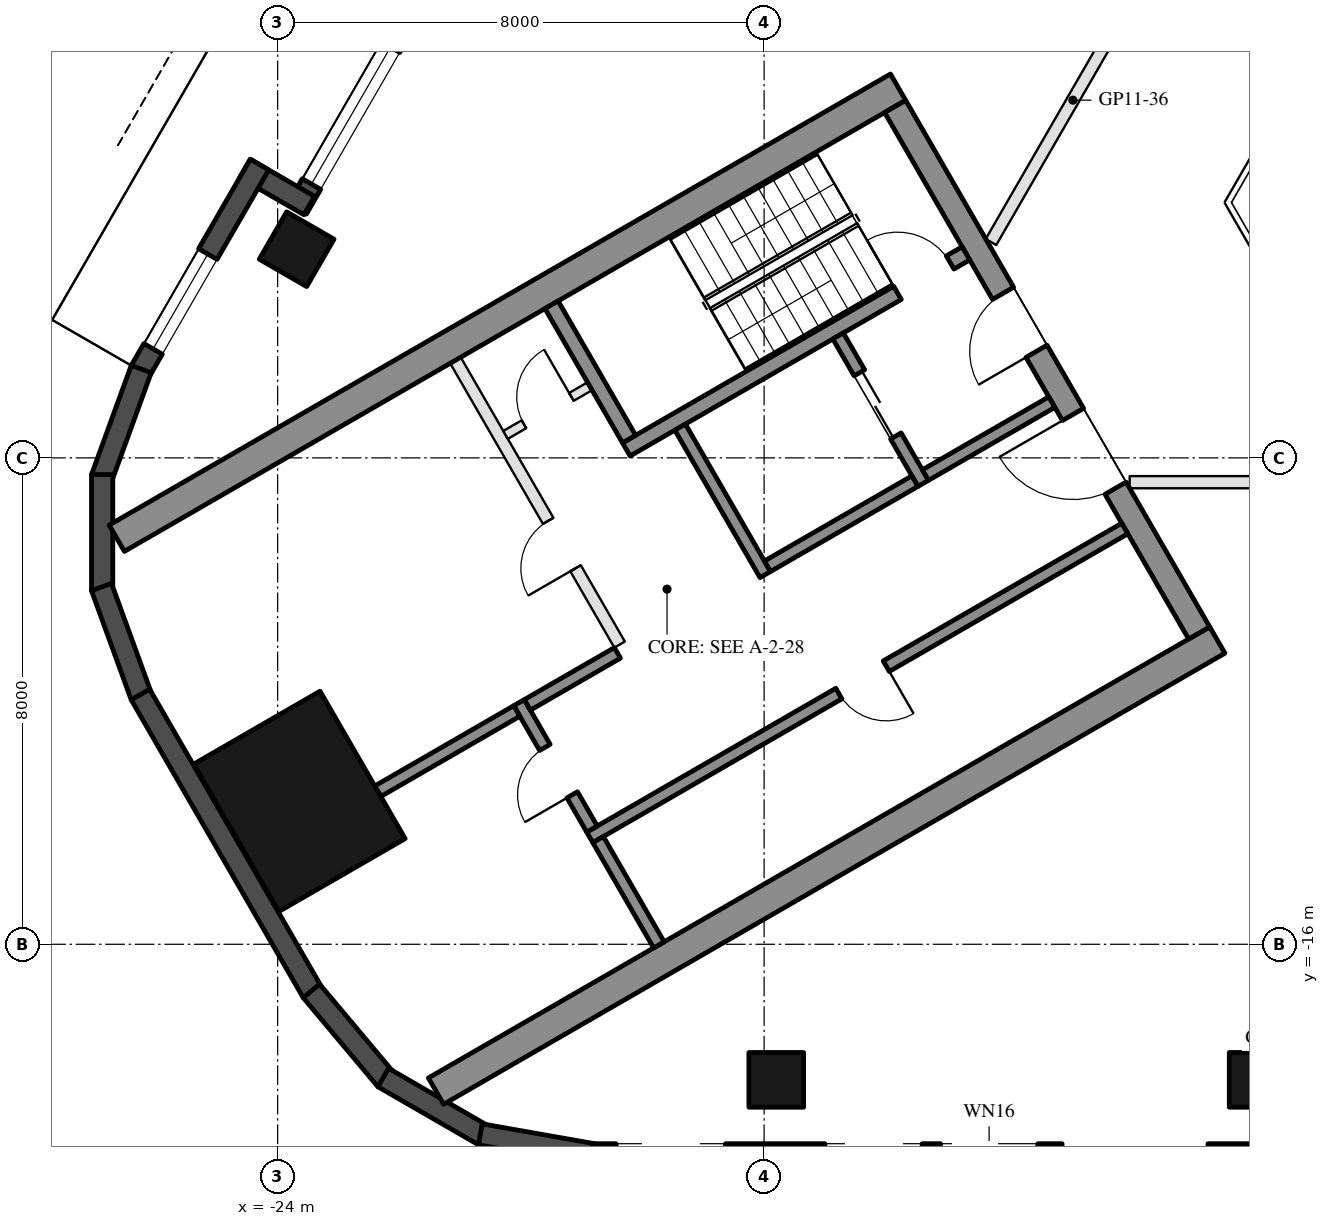
"""IFC4 building model, lengths in metres.
Left out: names, types, materials, properties, quantities, classifications, styles, units other than length and angle.
Written with IfcOpenShell. Run it as: python <this file> out.ifc"""

import sys

from ifc_helpers import new_model, si_unit, direction, frame, frame_2d, origin, origin_2d, place, context, subcontext, project, spatial, rectangle, hollow_rectangle, extrude, element, fill, save


model = new_model("IFC4")
c1 = context("Model", 3, precision=1e-05, world=origin(), true_north=direction((0.0, 1.0)))
c2 = subcontext(c1, "Body", "Model", "MODEL_VIEW")
j1 = project(units=[si_unit("LENGTHUNIT", "METRE"), si_unit("PLANEANGLEUNIT", "RADIAN")], contexts=[c1])
p1 = place(None, origin())
s1 = spatial("IfcSite", under=j1, at=p1, CompositionType="ELEMENT")
p2 = place(p1, origin())
s2 = spatial("IfcBuilding", under=s1, at=p2, CompositionType="ELEMENT")
p3 = place(p2, frame((0.0, 0.0, 124.2)))
s3 = spatial("IfcBuildingStorey", under=s2, at=p3, CompositionType="ELEMENT", Elevation=124.2)
for number, where, z_axis, x_axis in (
    (1, (-15.8, -18.23, 0.0), (0.0, 0.0, 1.0), (-1.0, 0.0, 0.0)),
    (2, (-7.9, -18.23, 0.0), (0.0, 0.0, 1.0), (-1.0, 0.0, 0.0)),
    (3, (-23.688, -4.568, 0.0), (0.0, 0.0, 1.0), (0.5, 0.866, 0.0)),
):
    element("IfcColumn", number, at=place(p3, frame(where, z_axis=z_axis, x_axis=x_axis)), inside=s3, PredefinedType="COLUMN", context=c2, shape_type="SweptSolid", body=[
        extrude(hollow_rectangle(XDim=0.9, YDim=0.9, WallThickness=0.04, at=origin_2d()), origin(), (0.0, 0.0, 1.0), 3.7),
    ])
p4 = place(p3, frame((-23.643, -13.65, 0.0), z_axis=(0.0, 0.0, 1.0), x_axis=(-0.5, 0.866025403784, 0.0)))
e4 = element("IfcColumn", 4, at=p4, inside=s3, PredefinedType="COLUMN", context=c2, shape_type="SweptSolid", body=[
    extrude(hollow_rectangle(XDim=2.8, YDim=2.4, WallThickness=0.07, at=origin_2d()), origin(), (0.0, 0.0, 1.0), 3.7),
])
p5 = place(p3, frame((-20.309, 1.934, 0.0), z_axis=(0.0, 0.0, 1.0), x_axis=(-0.499992114976, -0.866029956157, 0.0)))
e5 = element("IfcWall", 5, at=p5, inside=s3, PredefinedType="SOLIDWALL", context=c2, shape_type="SweptSolid", body=[
    extrude(rectangle(XDim=6.74, YDim=0.35, at=frame_2d((3.37, 0.0))), origin(), (0.0, 0.0, 1.0), 3.55),
])
p6 = place(p5, frame((0.77, 0.0, 0.3)))
e6 = element("IfcOpeningElement", 6, at=p6, cuts=e5, PredefinedType="OPENING", context=c2, shape_type="SweptSolid", body=[
    extrude(rectangle(XDim=2.6, YDim=2.65, at=frame_2d((1.3, 1.325))), frame((0.0, 0.185, 0.0), z_axis=(0.0, -1.0, 0.0), x_axis=(1.0, 0.0, 0.0)), (0.0, 0.0, 1.0), 0.37),
])
p7 = place(p5, frame((3.67, 0.0, 0.3)))
e7 = element("IfcOpeningElement", 7, at=p7, cuts=e5, PredefinedType="OPENING", context=c2, shape_type="SweptSolid", body=[
    extrude(rectangle(XDim=2.6, YDim=2.65, at=frame_2d((1.3, 1.325))), frame((0.0, 0.185, 0.0), z_axis=(0.0, -1.0, 0.0), x_axis=(1.0, 0.0, 0.0)), (0.0, 0.0, 1.0), 0.37),
])
p8 = place(p3, frame((-23.481, -3.85, 0.0), z_axis=(0.0, 0.0, 1.0), x_axis=(-0.866092288191, 0.499884134912, 0.0)))
e8 = element("IfcWall", 8, at=p8, inside=s3, PredefinedType="SOLIDWALL", context=c2, shape_type="SweptSolid", body=[
    extrude(rectangle(XDim=1.22, YDim=0.35, at=frame_2d((0.61, 0.0))), origin(), (0.0, 0.0, 1.0), 3.55),
])
p9 = place(p3, frame((-24.299, -3.176, 0.0), z_axis=(0.0, 0.0, 1.0), x_axis=(-0.500028278809, -0.866009076391, 0.0)))
e9 = element("IfcWall", 9, at=p9, inside=s3, PredefinedType="SOLIDWALL", context=c2, shape_type="SweptSolid", body=[
    extrude(rectangle(XDim=3.916, YDim=0.35, at=frame_2d((1.958, 0.0))), origin(), (0.0, 0.0, 1.0), 3.55),
])
p10 = place(p9, frame((1.7, 0.0, 0.3)))
e10 = element("IfcOpeningElement", 10, at=p10, cuts=e9, PredefinedType="OPENING", context=c2, shape_type="SweptSolid", body=[
    extrude(rectangle(XDim=1.8, YDim=2.65, at=frame_2d((0.9, 1.325))), frame((0.0, 0.185, 0.0), z_axis=(0.0, -1.0, 0.0), x_axis=(1.0, 0.0, 0.0)), (0.0, 0.0, 1.0), 0.37),
])
for number, where, z_axis, x_axis in (
    (11, (-26.244, -6.54, 0.0), (0.0, 0.0, 1.0), (-0.342, -0.94, 0.0)),
    (12, (-26.886, -8.275, 0.0), (0.0, 0.0, 1.0), (0.0, -1.0, 0.0)),
    (13, (-26.897, -10.125, 0.0), (0.0, 0.0, 1.0), (0.342, -0.94, 0.0)),
):
    element("IfcWall", number, at=place(p3, frame(where, z_axis=z_axis, x_axis=x_axis)), inside=s3, PredefinedType="SOLIDWALL", context=c2, shape_type="SweptSolid", body=[
        extrude(rectangle(XDim=1.91, YDim=0.35, at=frame_2d((0.955, 0.0))), origin(), (0.0, 0.0, 1.0), 3.55),
    ])
p11 = place(p3, frame((-26.257, -11.893, 0.0), z_axis=(0.0, 0.0, 1.0), x_axis=(0.500018773155, -0.866014564827, 0.0)))
e14 = element("IfcWall", 14, at=p11, inside=s3, PredefinedType="SOLIDWALL", context=c2, shape_type="SweptSolid", body=[
    extrude(rectangle(XDim=5.658, YDim=0.35, at=frame_2d((2.829, 0.0))), origin(), (0.0, 0.0, 1.0), 3.55),
])
for number, where, z_axis, x_axis in (
    (15, (-23.445, -16.768, 0.0), (0.0, 0.0, 1.0), (0.643, -0.766, 0.0)),
    (16, (-22.264, -18.192, 0.0), (0.0, 0.0, 1.0), (0.866, -0.5, 0.0)),
):
    element("IfcWall", number, at=place(p3, frame(where, z_axis=z_axis, x_axis=x_axis)), inside=s3, PredefinedType="SOLIDWALL", context=c2, shape_type="SweptSolid", body=[
        extrude(rectangle(XDim=1.91, YDim=0.35, at=frame_2d((0.955, 0.0))), origin(), (0.0, 0.0, 1.0), 3.55),
    ])
p12 = place(p3, frame((-20.667, -19.126, 0.0), z_axis=(0.0, 0.0, 1.0), x_axis=(0.984798995425, -0.173697837091, 0.0)))
e17 = element("IfcWall", 17, at=p12, inside=s3, PredefinedType="SOLIDWALL", context=c2, shape_type="SweptSolid", body=[
    extrude(rectangle(XDim=1.91, YDim=0.35, at=frame_2d((0.955, 0.0))), origin(), (0.0, 0.0, 1.0), 3.55),
])
p13 = place(p3, frame((-18.816, -19.455, 0.0), z_axis=(0.0, 0.0, 1.0), x_axis=(1.0, 0.0, 0.0)))
e18 = element("IfcWall", 18, at=p13, inside=s3, PredefinedType="SOLIDWALL", context=c2, shape_type="SweptSolid", body=[
    extrude(rectangle(XDim=11.816, YDim=0.35, at=frame_2d((5.908, 0.0))), origin(), (0.0, 0.0, 1.0), 3.55),
])
p14 = place(p13, frame((0.381, 0.0, 0.3)))
e19 = element("IfcOpeningElement", 19, at=p14, cuts=e18, PredefinedType="OPENING", context=c2, shape_type="SweptSolid", body=[
    extrude(rectangle(XDim=1.8, YDim=2.65, at=frame_2d((0.9, 1.325))), frame((0.0, 0.185, 0.0), z_axis=(0.0, -1.0, 0.0), x_axis=(1.0, 0.0, 0.0)), (0.0, 0.0, 1.0), 0.37),
])
p15 = place(p13, frame((7.716, 0.0, 0.0)))
e20 = element("IfcOpeningElement", 20, at=p15, cuts=e18, PredefinedType="OPENING", context=c2, shape_type="SweptSolid", body=[
    extrude(rectangle(XDim=2.4, YDim=2.4, at=frame_2d((1.2, 1.2))), frame((0.0, 0.185, 0.0), z_axis=(0.0, -1.0, 0.0), x_axis=(1.0, 0.0, 0.0)), (0.0, 0.0, 1.0), 0.37),
])
p16 = place(p13, frame((3.816, 0.0, 0.3)))
e21 = element("IfcOpeningElement", 21, at=p16, cuts=e18, PredefinedType="OPENING", context=c2, shape_type="SweptSolid", body=[
    extrude(rectangle(XDim=1.6, YDim=2.65, at=frame_2d((0.8, 1.325))), frame((0.0, 0.185, 0.0), z_axis=(0.0, -1.0, 0.0), x_axis=(1.0, 0.0, 0.0)), (0.0, 0.0, 1.0), 0.37),
])
p17 = place(p13, frame((5.716, 0.0, 0.3)))
e22 = element("IfcOpeningElement", 22, at=p17, cuts=e18, PredefinedType="OPENING", context=c2, shape_type="SweptSolid", body=[
    extrude(rectangle(XDim=1.6, YDim=2.65, at=frame_2d((0.8, 1.325))), frame((0.0, 0.185, 0.0), z_axis=(0.0, -1.0, 0.0), x_axis=(1.0, 0.0, 0.0)), (0.0, 0.0, 1.0), 0.37),
])
for number, where, z_axis, x_axis in (
    (23, (-13.797, -1.903, 0.0), (0.0, 0.0, 1.0), (-0.866, -0.5, 0.0)),
    (24, (-8.547, -10.997, 0.0), (0.0, 0.0, 1.0), (-0.866, -0.5, 0.0)),
):
    element("IfcWall", number, at=place(p3, frame(where, z_axis=z_axis, x_axis=x_axis)), inside=s3, PredefinedType="SHEAR", context=c2, shape_type="SweptSolid", body=[
        extrude(rectangle(XDim=14.837, YDim=0.5, at=frame_2d((7.418, 0.0))), origin(), (0.0, 0.0, 1.0), 3.5),
    ])
p18 = place(p3, frame((-13.845, -2.22, 0.0), z_axis=(0.0, 0.0, 1.0), x_axis=(0.500004234368, -0.866022959057, 0.0)))
e25 = element("IfcWall", 25, at=p18, inside=s3, PredefinedType="SHEAR", context=c2, shape_type="SweptSolid", body=[
    extrude(rectangle(XDim=10.0, YDim=0.4, at=frame_2d((5.0, 0.0))), origin(), (0.0, 0.0, 1.0), 3.5),
])
p19 = place(p18, frame((3.55, 0.0, 0.0)))
e26 = element("IfcOpeningElement", 26, at=p19, cuts=e25, PredefinedType="OPENING", context=c2, shape_type="SweptSolid", body=[
    extrude(rectangle(XDim=1.1, YDim=2.1, at=frame_2d((0.55, 1.05))), frame((0.0, 0.21, 0.0), z_axis=(0.0, -1.0, 0.0), x_axis=(1.0, 0.0, 0.0)), (0.0, 0.0, 1.0), 0.42),
])
p20 = place(p18, frame((5.85, 0.0, 0.0)))
e27 = element("IfcOpeningElement", 27, at=p20, cuts=e25, PredefinedType="OPENING", context=c2, shape_type="SweptSolid", body=[
    extrude(rectangle(XDim=1.4, YDim=2.1, at=frame_2d((0.7, 1.05))), frame((0.0, 0.21, 0.0), z_axis=(0.0, -1.0, 0.0), x_axis=(1.0, 0.0, 0.0)), (0.0, 0.0, 1.0), 0.42),
])
p21 = place(p3, frame((-12.681, -4.636, 0.0), z_axis=(0.0, 0.0, 1.0), x_axis=(-0.866021702275, -0.500006411147, 0.0)))
e28 = element("IfcWall", 28, at=p21, inside=s3, PredefinedType="SHEAR", context=c2, shape_type="SweptSolid", body=[
    extrude(rectangle(XDim=6.45, YDim=0.25, at=frame_2d((3.225, 0.0))), origin(), (0.0, 0.0, 1.0), 3.5),
])
p22 = place(p21, frame((0.3, 0.0, 0.0)))
e29 = element("IfcOpeningElement", 29, at=p22, cuts=e28, PredefinedType="OPENING", context=c2, shape_type="SweptSolid", body=[
    extrude(rectangle(XDim=1.0, YDim=2.1, at=frame_2d((0.5, 1.05))), frame((0.0, 0.135, 0.0), z_axis=(0.0, -1.0, 0.0), x_axis=(1.0, 0.0, 0.0)), (0.0, 0.0, 1.0), 0.27),
])
p23 = place(p3, frame((-19.496, -5.482, 0.0), z_axis=(0.0, 0.0, 1.0), x_axis=(0.499990435942, -0.866030925526, 0.0)))
e30 = element("IfcWall", 30, at=p23, inside=s3, PredefinedType="SHEAR", context=c2, shape_type="SweptSolid", body=[
    extrude(rectangle(XDim=2.55, YDim=0.25, at=frame_2d((1.275, 0.0))), origin(), (0.0, 0.0, 1.0), 3.5),
])
p24 = place(p3, frame((-17.381, -7.495, 0.0), z_axis=(0.0, 0.0, 1.0), x_axis=(0.500011755427, -0.866018616679, 0.0)))
e31 = element("IfcWall", 31, at=p24, inside=s3, PredefinedType="SHEAR", context=c2, shape_type="SweptSolid", body=[
    extrude(rectangle(XDim=2.8, YDim=0.2, at=frame_2d((1.4, 0.0))), origin(), (0.0, 0.0, 1.0), 3.5),
])
p25 = place(p3, frame((-14.783, -5.995, 0.0), z_axis=(0.0, 0.0, 1.0), x_axis=(0.49994636267, -0.866056369097, 0.0)))
e32 = element("IfcWall", 32, at=p25, inside=s3, PredefinedType="SHEAR", context=c2, shape_type="SweptSolid", body=[
    extrude(rectangle(XDim=2.8, YDim=0.2, at=frame_2d((1.4, 0.0))), origin(), (0.0, 0.0, 1.0), 3.5),
])
p26 = place(p25, frame((0.7, 0.0, 0.0)))
e33 = element("IfcOpeningElement", 33, at=p26, cuts=e32, PredefinedType="OPENING", context=c2, shape_type="SweptSolid", body=[
    extrude(rectangle(XDim=1.2, YDim=2.1, at=frame_2d((0.6, 1.05))), frame((0.0, 0.11, 0.0), z_axis=(0.0, -1.0, 0.0), x_axis=(1.0, 0.0, 0.0)), (0.0, 0.0, 1.0), 0.22),
])
p27 = place(p3, frame((-13.52, -8.383, 0.0), z_axis=(0.0, 0.0, 1.0), x_axis=(-0.866034573852, -0.49998411664, 0.0)))
e34 = element("IfcWall", 34, at=p27, inside=s3, PredefinedType="SHEAR", context=c2, shape_type="SweptSolid", body=[
    extrude(rectangle(XDim=2.8, YDim=0.2, at=frame_2d((1.4, 0.0))), origin(), (0.0, 0.0, 1.0), 3.5),
])
p28 = place(p3, frame((-11.268, -7.083, 0.0), z_axis=(0.0, 0.0, 1.0), x_axis=(-0.866050077142, -0.499957262057, 0.0)))
e35 = element("IfcWall", 35, at=p28, inside=s3, PredefinedType="SHEAR", context=c2, shape_type="SweptSolid", body=[
    extrude(rectangle(XDim=2.4, YDim=0.2, at=frame_2d((1.2, 0.0))), origin(), (0.0, 0.0, 1.0), 3.5),
])
p29 = place(p3, frame((-10.068, -9.162, 0.0), z_axis=(0.0, 0.0, 1.0), x_axis=(-0.866032725843, -0.499987317609, 0.0)))
e36 = element("IfcWall", 36, at=p29, inside=s3, PredefinedType="SHEAR", context=c2, shape_type="SweptSolid", body=[
    extrude(rectangle(XDim=10.16, YDim=0.2, at=frame_2d((5.08, 0.0))), origin(), (0.0, 0.0, 1.0), 3.5),
])
p30 = place(p29, frame((4.53, 0.0, 0.0)))
e37 = element("IfcOpeningElement", 37, at=p30, cuts=e36, PredefinedType="OPENING", context=c2, shape_type="SweptSolid", body=[
    extrude(rectangle(XDim=0.9, YDim=2.1, at=frame_2d((0.45, 1.05))), frame((0.0, 0.11, 0.0), z_axis=(0.0, -1.0, 0.0), x_axis=(1.0, 0.0, 0.0)), (0.0, 0.0, 1.0), 0.22),
])
p31 = place(p3, frame((-20.031, -12.026, 0.0), z_axis=(0.0, 0.0, 1.0), x_axis=(0.500033551112, -0.866006032174, 0.0)))
e38 = element("IfcWall", 38, at=p31, inside=s3, PredefinedType="SHEAR", context=c2, shape_type="SweptSolid", body=[
    extrude(rectangle(XDim=2.4, YDim=0.2, at=frame_2d((1.2, 0.0))), origin(), (0.0, 0.0, 1.0), 3.5),
])
p32 = place(p31, frame((0.85, 0.0, 0.0)))
e39 = element("IfcOpeningElement", 39, at=p32, cuts=e38, PredefinedType="OPENING", context=c2, shape_type="SweptSolid", body=[
    extrude(rectangle(XDim=0.9, YDim=2.1, at=frame_2d((0.45, 1.05))), frame((0.0, 0.11, 0.0), z_axis=(0.0, -1.0, 0.0), x_axis=(1.0, 0.0, 0.0)), (0.0, 0.0, 1.0), 0.22),
])
p33 = place(p3, frame((-18.413, -11.208, 0.0), z_axis=(0.0, 0.0, 1.0), x_axis=(-0.866038183914, -0.499977863513, 0.0)))
e40 = element("IfcWall", 40, at=p33, inside=s3, PredefinedType="SHEAR", context=c2, shape_type="SweptSolid", body=[
    extrude(rectangle(XDim=1.71, YDim=0.2, at=frame_2d((0.855, 0.0))), origin(), (0.0, 0.0, 1.0), 3.5),
])
p34 = place(p3, frame((-18.73, -14.278, 0.0), z_axis=(0.0, 0.0, 1.0), x_axis=(0.50002537861, -0.866010750942, 0.0)))
e41 = element("IfcWall", 41, at=p34, inside=s3, PredefinedType="SHEAR", context=c2, shape_type="SweptSolid", body=[
    extrude(rectangle(XDim=2.0, YDim=0.2, at=frame_2d((1.0, 0.0))), origin(), (0.0, 0.0, 1.0), 3.5),
])
p35 = place(p3, frame((-20.067, -12.163, 0.0), z_axis=(0.0, 0.0, 1.0), x_axis=(-0.866060851709, -0.499938597367, 0.0)))
e42 = element("IfcWall", 42, at=p35, inside=s3, PredefinedType="SHEAR", context=c2, shape_type="SweptSolid", body=[
    extrude(rectangle(XDim=2.64, YDim=0.2, at=frame_2d((1.32, 0.0))), origin(), (0.0, 0.0, 1.0), 3.5),
])
p36 = place(p3, frame((-21.076, -6.395, 0.0), z_axis=(0.0, 0.0, 1.0), x_axis=(0.50001468107, -0.866016927499, 0.0)))
e43 = element("IfcWall", 43, at=p36, inside=s3, PredefinedType="PARTITIONING", context=c2, shape_type="SweptSolid", body=[
    extrude(rectangle(XDim=5.4, YDim=0.2, at=frame_2d((2.7, 0.0))), origin(), (0.0, 0.0, 1.0), 3.5),
])
p37 = place(p36, frame((3.05, 0.0, 0.0)))
e44 = element("IfcOpeningElement", 44, at=p37, cuts=e43, PredefinedType="OPENING", context=c2, shape_type="SweptSolid", body=[
    extrude(rectangle(XDim=0.9, YDim=2.1, at=frame_2d((0.45, 1.05))), frame((0.0, 0.11, 0.0), z_axis=(0.0, -1.0, 0.0), x_axis=(1.0, 0.0, 0.0)), (0.0, 0.0, 1.0), 0.22),
])
p38 = place(p3, frame((-18.866, -6.822, 0.0), z_axis=(0.0, 0.0, 1.0), x_axis=(-0.866028054938, -0.499995408039, 0.0)))
e45 = element("IfcWall", 45, at=p38, inside=s3, PredefinedType="PARTITIONING", context=c2, shape_type="SweptSolid", body=[
    extrude(rectangle(XDim=1.6, YDim=0.15, at=frame_2d((0.8, 0.0))), origin(), (0.0, 0.0, 1.0), 3.5),
])
p39 = place(p38, frame((0.35, 0.0, 0.0)))
e46 = element("IfcOpeningElement", 46, at=p39, cuts=e45, PredefinedType="OPENING", context=c2, shape_type="SweptSolid", body=[
    extrude(rectangle(XDim=0.9, YDim=2.1, at=frame_2d((0.45, 1.05))), frame((0.0, 0.085, 0.0), z_axis=(0.0, -1.0, 0.0), x_axis=(1.0, 0.0, 0.0)), (0.0, 0.0, 1.0), 0.17),
])
p40 = place(p3, frame((0.909, -8.4, 0.0), z_axis=(0.0, 0.0, 1.0), x_axis=(-1.0, 0.0, 0.0)))
e47 = element("IfcWall", 47, at=p40, inside=s3, PredefinedType="PARTITIONING", context=c2, shape_type="SweptSolid", body=[
    extrude(rectangle(XDim=10.897, YDim=0.2, at=frame_2d((5.448, 0.0))), origin(), (0.0, 0.0, 1.0), 2.95),
])
p41 = place(p40, frame((4.948, 0.0, 0.0)))
e48 = element("IfcOpeningElement", 48, at=p41, cuts=e47, PredefinedType="OPENING", context=c2, shape_type="SweptSolid", body=[
    extrude(rectangle(XDim=1.0, YDim=2.1, at=frame_2d((0.5, 1.05))), frame((0.0, 0.11, 0.0), z_axis=(0.0, -1.0, 0.0), x_axis=(1.0, 0.0, 0.0)), (0.0, 0.0, 1.0), 0.22),
])
p42 = place(p3, frame((-12.269, -4.45, 0.0), z_axis=(0.0, 0.0, 1.0), x_axis=(0.500004878216, 0.866022587327, 0.0)))
e49 = element("IfcWall", 49, at=p42, inside=s3, PredefinedType="PARTITIONING", context=c2, shape_type="SweptSolid", body=[
    extrude(rectangle(XDim=8.979, YDim=0.2, at=frame_2d((4.49, 0.0))), origin(), (0.0, 0.0, 1.0), 2.95),
])
p43 = place(p42, frame((3.99, 0.0, 0.0)))
e50 = element("IfcOpeningElement", 50, at=p43, cuts=e49, PredefinedType="OPENING", context=c2, shape_type="SweptSolid", body=[
    extrude(rectangle(XDim=1.0, YDim=2.1, at=frame_2d((0.5, 1.05))), frame((0.0, 0.11, 0.0), z_axis=(0.0, -1.0, 0.0), x_axis=(1.0, 0.0, 0.0)), (0.0, 0.0, 1.0), 0.22),
])
p44 = place(p7, origin())
e51 = element("IfcWindow", 51, at=p44, inside=s3, PartitioningType="SINGLE_PANEL", PredefinedType="WINDOW", context=c2, shape_type="SweptSolid", body=[
    extrude(rectangle(XDim=2.6, YDim=2.65, at=frame_2d((1.3, 1.325))), frame((0.0, 0.03, 0.0), z_axis=(0.0, -1.0, 0.0), x_axis=(1.0, 0.0, 0.0)), (0.0, 0.0, 1.0), 0.06),
])
fill(e7, e51)
p45 = place(p10, origin())
e52 = element("IfcWindow", 52, at=p45, inside=s3, PartitioningType="SINGLE_PANEL", PredefinedType="WINDOW", context=c2, shape_type="SweptSolid", body=[
    extrude(rectangle(XDim=1.8, YDim=2.65, at=frame_2d((0.9, 1.325))), frame((0.0, 0.03, 0.0), z_axis=(0.0, -1.0, 0.0), x_axis=(1.0, 0.0, 0.0)), (0.0, 0.0, 1.0), 0.06),
])
fill(e10, e52)
p46 = place(p26, origin())
e53 = element("IfcDoor", 53, at=p46, inside=s3, OperationType="DOUBLE_DOOR_SLIDING", PredefinedType="DOOR", context=c2, shape_type="SweptSolid", body=[
    extrude(rectangle(XDim=1.2, YDim=2.1, at=frame_2d((0.6, 1.05))), frame((0.0, 0.025, 0.0), z_axis=(0.0, -1.0, 0.0), x_axis=(1.0, 0.0, 0.0)), (0.0, 0.0, 1.0), 0.05),
])
fill(e33, e53)
p47 = place(p39, frame((0.9, 0.0, 0.0), z_axis=(0.0, 0.0, 1.0), x_axis=(-1.0, 0.0, 0.0)))
e54 = element("IfcDoor", 54, at=p47, inside=s3, OperationType="SINGLE_SWING_RIGHT", PredefinedType="DOOR", context=c2, shape_type="SweptSolid", body=[
    extrude(rectangle(XDim=0.9, YDim=2.1, at=frame_2d((0.45, 1.05))), frame((0.0, 0.025, 0.0), z_axis=(0.0, -1.0, 0.0), x_axis=(1.0, 0.0, 0.0)), (0.0, 0.0, 1.0), 0.05),
])
fill(e46, e54)
p48 = place(p30, origin())
e55 = element("IfcDoor", 55, at=p48, inside=s3, OperationType="SINGLE_SWING_LEFT", PredefinedType="DOOR", context=c2, shape_type="SweptSolid", body=[
    extrude(rectangle(XDim=0.9, YDim=2.1, at=frame_2d((0.45, 1.05))), frame((0.0, 0.025, 0.0), z_axis=(0.0, -1.0, 0.0), x_axis=(1.0, 0.0, 0.0)), (0.0, 0.0, 1.0), 0.05),
])
fill(e37, e55)
p49 = place(p32, frame((0.9, 0.0, 0.0), z_axis=(0.0, 0.0, 1.0), x_axis=(-1.0, 0.0, 0.0)))
e56 = element("IfcDoor", 56, at=p49, inside=s3, OperationType="SINGLE_SWING_LEFT", PredefinedType="DOOR", context=c2, shape_type="SweptSolid", body=[
    extrude(rectangle(XDim=0.9, YDim=2.1, at=frame_2d((0.45, 1.05))), frame((0.0, 0.025, 0.0), z_axis=(0.0, -1.0, 0.0), x_axis=(1.0, 0.0, 0.0)), (0.0, 0.0, 1.0), 0.05),
])
fill(e39, e56)
p50 = place(p37, frame((0.9, 0.0, 0.0), z_axis=(0.0, 0.0, 1.0), x_axis=(-1.0, 0.0, 0.0)))
e57 = element("IfcDoor", 57, at=p50, inside=s3, OperationType="SINGLE_SWING_LEFT", PredefinedType="DOOR", context=c2, shape_type="SweptSolid", body=[
    extrude(rectangle(XDim=0.9, YDim=2.1, at=frame_2d((0.45, 1.05))), frame((0.0, 0.025, 0.0), z_axis=(0.0, -1.0, 0.0), x_axis=(1.0, 0.0, 0.0)), (0.0, 0.0, 1.0), 0.05),
])
fill(e44, e57)
p51 = place(p19, frame((1.1, 0.0, 0.0), z_axis=(0.0, 0.0, 1.0), x_axis=(-1.0, 0.0, 0.0)))
e58 = element("IfcDoor", 58, at=p51, inside=s3, OperationType="SINGLE_SWING_LEFT", PredefinedType="DOOR", context=c2, shape_type="SweptSolid", body=[
    extrude(rectangle(XDim=1.1, YDim=2.1, at=frame_2d((0.55, 1.05))), frame((0.0, 0.025, 0.0), z_axis=(0.0, -1.0, 0.0), x_axis=(1.0, 0.0, 0.0)), (0.0, 0.0, 1.0), 0.05),
])
fill(e26, e58)
p52 = place(p20, frame((1.4, 0.0, 0.0), z_axis=(0.0, 0.0, 1.0), x_axis=(-1.0, 0.0, 0.0)))
e59 = element("IfcDoor", 59, at=p52, inside=s3, OperationType="DOUBLE_DOOR_SINGLE_SWING", PredefinedType="DOOR", context=c2, shape_type="SweptSolid", body=[
    extrude(rectangle(XDim=1.4, YDim=2.1, at=frame_2d((0.7, 1.05))), frame((0.0, 0.025, 0.0), z_axis=(0.0, -1.0, 0.0), x_axis=(1.0, 0.0, 0.0)), (0.0, 0.0, 1.0), 0.05),
])
fill(e27, e59)
p53 = place(p22, frame((1.0, 0.0, 0.0), z_axis=(0.0, 0.0, 1.0), x_axis=(-1.0, 0.0, 0.0)))
e60 = element("IfcDoor", 60, at=p53, inside=s3, OperationType="SINGLE_SWING_LEFT", PredefinedType="DOOR", context=c2, shape_type="SweptSolid", body=[
    extrude(rectangle(XDim=1.0, YDim=2.1, at=frame_2d((0.5, 1.05))), frame((0.0, 0.025, 0.0), z_axis=(0.0, -1.0, 0.0), x_axis=(1.0, 0.0, 0.0)), (0.0, 0.0, 1.0), 0.05),
])
fill(e29, e60)
save(model, sys.argv[1])
